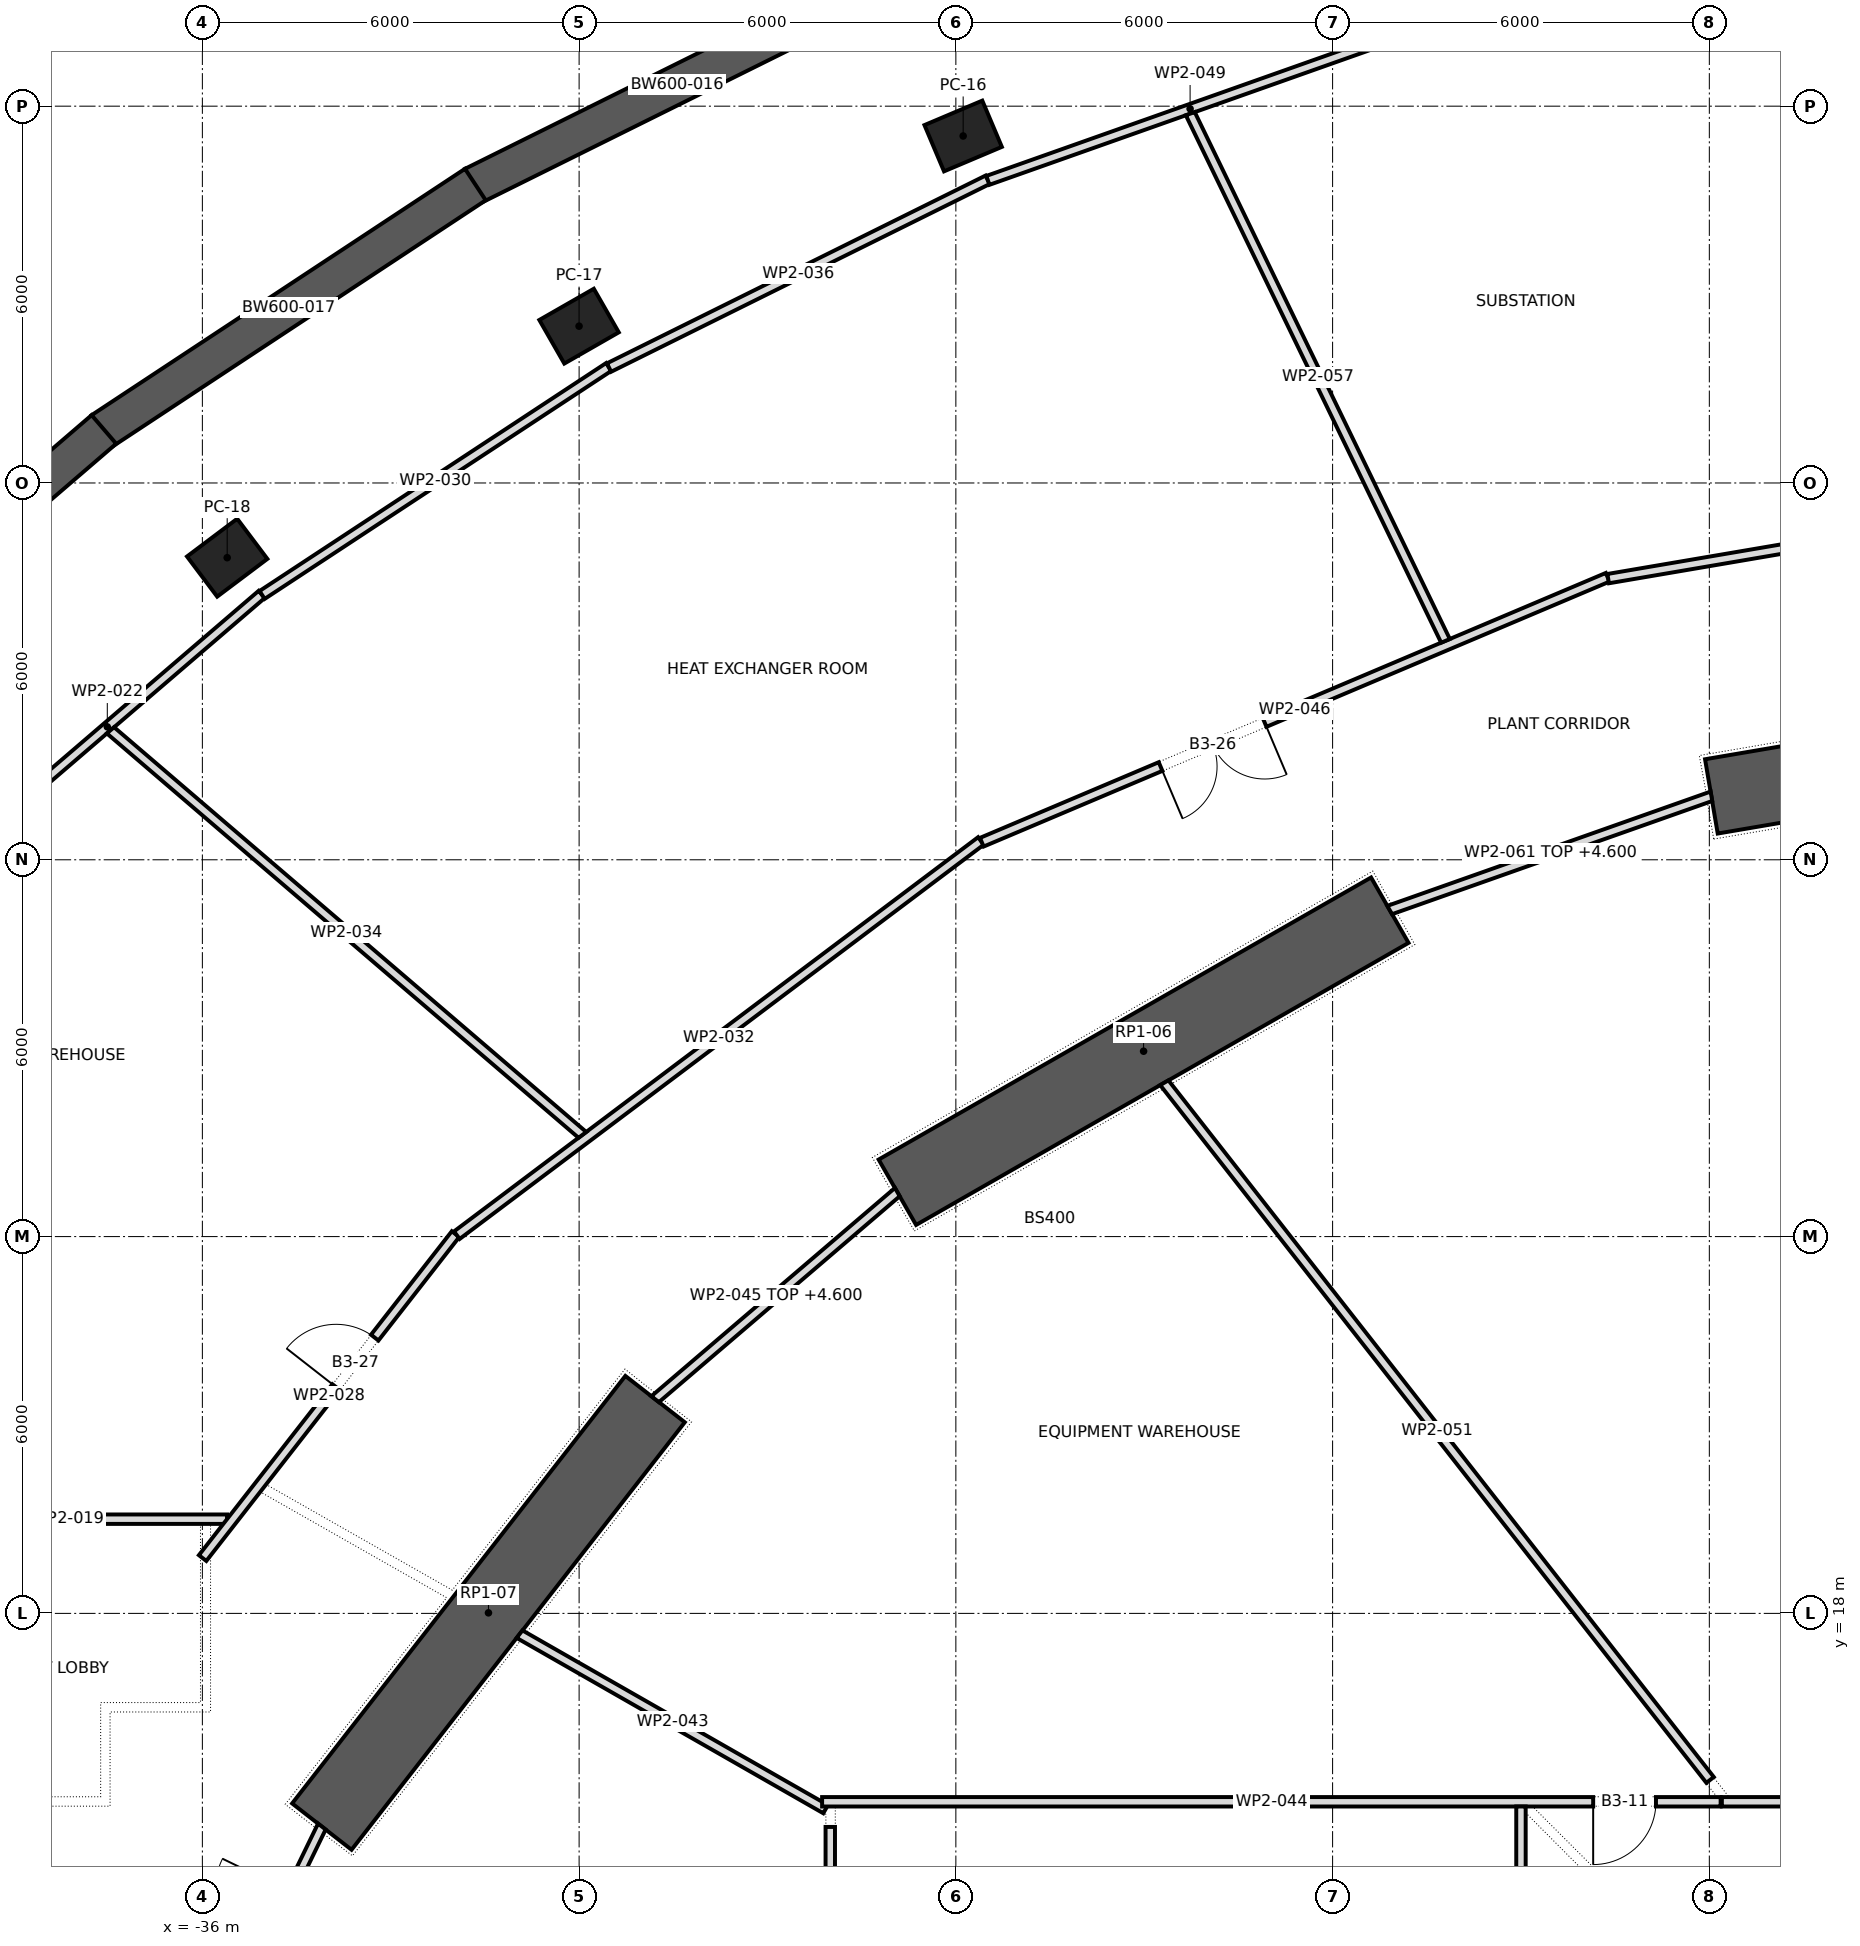
"""IFC4 building model, lengths in metres.
Left out: names, types, materials, properties, quantities, classifications, styles, units other than length and angle.
Written with IfcOpenShell. Run it as: python <this file> out.ifc"""

import sys

from ifc_helpers import new_model, si_unit, direction, frame, frame_2d, origin, origin_2d, place, context, subcontext, project, spatial, polyline, rectangle, outline, extrude, element, fill, save


model = new_model("IFC4")
c1 = context("Model", 3, precision=1e-05, world=origin(), true_north=direction((0.0, 1.0)))
c2 = subcontext(c1, "Body", "Model", "MODEL_VIEW")
j1 = project(units=[si_unit("LENGTHUNIT", "METRE"), si_unit("PLANEANGLEUNIT", "RADIAN")], contexts=[c1])
p1 = place(None, origin())
s1 = spatial("IfcSite", under=j1, at=p1, CompositionType="ELEMENT")
p2 = place(p1, origin())
s2 = spatial("IfcBuilding", under=s1, at=p2, CompositionType="ELEMENT")
p3 = place(p2, frame((0.0, 0.0, -15.0)))
s3 = spatial("IfcBuildingStorey", under=s2, at=p3, CompositionType="ELEMENT", Elevation=-15.0)
for number, where, z_axis, x_axis in (
    (1, (-23.884, 41.525, -0.4), (0.0, 0.0, 1.0), (-0.921, -0.389, 0.0)),
    (2, (-30.001, 38.497, -0.4), (0.0, 0.0, 1.0), (-0.868, -0.497, 0.0)),
    (3, (-35.605, 34.81, -0.4), (0.0, 0.0, 1.0), (-0.799, -0.601, 0.0)),
):
    element("IfcColumn", number, at=place(p3, frame(where, z_axis=z_axis, x_axis=x_axis)), inside=s3, PredefinedType="COLUMN", context=c2, shape_type="SweptSolid", body=[
        extrude(rectangle(XDim=1.0, YDim=0.8, at=origin_2d()), origin(), (0.0, 0.0, 1.0), 5.9),
    ])
p4 = place(p3, frame((-2.788, 32.574, -0.4), z_axis=(0.0, 0.0, 1.0), x_axis=(-0.985776286846, -0.168062822456, 0.0)))
e4 = element("IfcWall", 4, at=p4, inside=s3, PredefinedType="SHEAR", context=c2, shape_type="SweptSolid", body=[
    extrude(rectangle(XDim=9.312, YDim=1.2, at=frame_2d((4.656, 0.0))), origin(), (0.0, 0.0, 1.0), 5.9),
])
p5 = place(p3, frame((-17.089, 29.198, -0.4), z_axis=(0.0, 0.0, 1.0), x_axis=(-0.867760656864, -0.496982336103, 0.0)))
e5 = element("IfcWall", 5, at=p5, inside=s3, PredefinedType="SHEAR", context=c2, shape_type="SweptSolid", body=[
    extrude(rectangle(XDim=9.038, YDim=1.2, at=frame_2d((4.519, 0.0))), origin(), (0.0, 0.0, 1.0), 5.9),
])
p6 = place(p3, frame((-28.79, 21.412, -0.4), z_axis=(0.0, 0.0, 1.0), x_axis=(-0.614825322247, -0.788663314174, 0.0)))
e6 = element("IfcWall", 6, at=p6, inside=s3, PredefinedType="SHEAR", context=c2, shape_type="SweptSolid", body=[
    extrude(rectangle(XDim=8.632, YDim=1.2, at=frame_2d((4.316, 0.0))), origin(), (0.0, 0.0, 1.0), 5.9),
])
p7 = place(p3, frame((-25.195, 43.955, -0.4), z_axis=(0.0, 0.0, 1.0), x_axis=(-0.895750986496, -0.44455614965, 0.0)))
e7 = element("IfcWall", 7, at=p7, inside=s3, PredefinedType="SOLIDWALL", context=c2, shape_type="SweptSolid", body=[
    extrude(rectangle(XDim=7.245, YDim=0.6, at=frame_2d((3.623, 0.0))), origin(), (0.0, 0.0, 1.0), 5.9),
])
p8 = place(p3, frame((-31.652, 40.752, -0.4), z_axis=(0.0, 0.0, 1.0), x_axis=(-0.834745196239, -0.550636411215, 0.0)))
e8 = element("IfcWall", 8, at=p8, inside=s3, PredefinedType="SOLIDWALL", context=c2, shape_type="SweptSolid", body=[
    extrude(rectangle(XDim=7.124, YDim=0.6, at=frame_2d((3.562, 0.0))), origin(), (0.0, 0.0, 1.0), 5.9),
])
p9 = place(p3, frame((-37.568, 36.853, -0.4), z_axis=(0.0, 0.0, 1.0), x_axis=(-0.758319142722, -0.65188348482, 0.0)))
e9 = element("IfcWall", 9, at=p9, inside=s3, PredefinedType="SOLIDWALL", context=c2, shape_type="SweptSolid", body=[
    extrude(rectangle(XDim=6.991, YDim=0.6, at=frame_2d((3.496, 0.0))), origin(), (0.0, 0.0, 1.0), 5.9),
])
p10 = place(p3, frame((-40.675, 19.5, 0.0), z_axis=(0.0, 0.0, 1.0), x_axis=(1.0, 0.0, 0.0)))
e10 = element("IfcWall", 10, at=p10, inside=s3, PredefinedType="PARTITIONING", context=c2, shape_type="SweptSolid", body=[
    extrude(rectangle(XDim=5.068, YDim=0.15, at=frame_2d((2.534, 0.0))), origin(), (0.0, 0.0, 1.0), 5.15),
])
p11 = place(p3, frame((-39.973, 30.007, 0.0), z_axis=(0.0, 0.0, 1.0), x_axis=(0.759038455419, 0.651045791934, 0.0)))
e11 = element("IfcWall", 11, at=p11, inside=s3, PredefinedType="PARTITIONING", context=c2, shape_type="SweptSolid", body=[
    extrude(rectangle(XDim=6.479, YDim=0.15, at=frame_2d((3.24, 0.0))), origin(), (0.0, 0.0, 1.0), 5.15),
])
p12 = place(p3, frame((-36.15, 10.38, 0.0), z_axis=(0.0, 0.0, 1.0), x_axis=(0.436936398764, 0.899492403212, 0.0)))
e12 = element("IfcWall", 12, at=p12, inside=s3, PredefinedType="PARTITIONING", context=c2, shape_type="SweptSolid", body=[
    extrude(outline(polyline([(0.017, -0.075), (4.682, -0.075), (4.714, 0.075), (-0.017, 0.075), (0.017, -0.075)])), origin(), (0.0, 0.0, 1.0), 4.6),
])
p13 = place(p12, frame((1.146, 0.0, 0.0)))
e13 = element("IfcOpeningElement", 13, at=p13, cuts=e12, PredefinedType="OPENING", context=c2, shape_type="SweptSolid", body=[
    extrude(rectangle(XDim=2.4, YDim=2.1, at=frame_2d((1.2, 1.05))), frame((0.0, 0.087, 0.0), z_axis=(0.0, -1.0, 0.0), x_axis=(1.0, 0.0, 0.0)), (0.0, 0.0, 1.0), 0.174),
])
p14 = place(p3, frame((-35.996, 18.881, 0.0), z_axis=(0.0, 0.0, 1.0), x_axis=(0.615457986142, 0.788169694478, 0.0)))
e14 = element("IfcWall", 14, at=p14, inside=s3, PredefinedType="PARTITIONING", context=c2, shape_type="SweptSolid", body=[
    extrude(rectangle(XDim=6.545, YDim=0.15, at=frame_2d((3.272, 0.0))), origin(), (0.0, 0.0, 1.0), 5.15),
])
p15 = place(p14, frame((3.454, 0.0, 0.0)))
e15 = element("IfcOpeningElement", 15, at=p15, cuts=e14, PredefinedType="OPENING", context=c2, shape_type="SweptSolid", body=[
    extrude(rectangle(XDim=1.0, YDim=2.1, at=frame_2d((0.5, 1.05))), frame((0.0, 0.087, 0.0), z_axis=(0.0, -1.0, 0.0), x_axis=(1.0, 0.0, 0.0)), (0.0, 0.0, 1.0), 0.174),
])
p16 = place(p3, frame((-35.049, 34.217, 0.0), z_axis=(0.0, 0.0, 1.0), x_axis=(0.83553583791, 0.549435950378, 0.0)))
e16 = element("IfcWall", 16, at=p16, inside=s3, PredefinedType="PARTITIONING", context=c2, shape_type="SweptSolid", body=[
    extrude(rectangle(XDim=6.606, YDim=0.15, at=frame_2d((3.303, 0.0))), origin(), (0.0, 0.0, 1.0), 5.15),
])
p17 = place(p3, frame((-31.947, 24.022, 0.0), z_axis=(0.0, 0.0, 1.0), x_axis=(0.799194171191, 0.601072937949, 0.0)))
e17 = element("IfcWall", 17, at=p17, inside=s3, PredefinedType="PARTITIONING", context=c2, shape_type="SweptSolid", body=[
    extrude(rectangle(XDim=10.444, YDim=0.15, at=frame_2d((5.222, 0.0))), origin(), (0.0, 0.0, 1.0), 5.15),
])
p18 = place(p3, frame((-29.947, 25.619, 0.0), z_axis=(0.0, 0.0, 1.0), x_axis=(-0.759265306208, 0.650781218836, 0.0)))
e18 = element("IfcWall", 18, at=p18, inside=s3, PredefinedType="PARTITIONING", context=c2, shape_type="SweptSolid", body=[
    extrude(outline(polyline([(-0.017, -0.075), (9.888, -0.075), (9.911, 0.075), (0.017, 0.075), (-0.017, -0.075)])), origin(), (0.0, 0.0, 1.0), 5.15),
])
p19 = place(p3, frame((-29.523, 37.838, 0.0), z_axis=(0.0, 0.0, 1.0), x_axis=(0.895909442692, 0.444236727991, 0.0)))
e19 = element("IfcWall", 19, at=p19, inside=s3, PredefinedType="PARTITIONING", context=c2, shape_type="SweptSolid", body=[
    extrude(rectangle(XDim=6.731, YDim=0.15, at=frame_2d((3.365, 0.0))), origin(), (0.0, 0.0, 1.0), 5.15),
])
p20 = place(p3, frame((-26.0, 7.425, 0.0), z_axis=(0.0, 0.0, 1.0), x_axis=(0.0, 1.0, 0.0)))
e20 = element("IfcWall", 20, at=p20, inside=s3, PredefinedType="PARTITIONING", context=c2, shape_type="SweptSolid", body=[
    extrude(rectangle(XDim=7.175, YDim=0.15, at=frame_2d((3.587, 0.0))), origin(), (0.0, 0.0, 1.0), 5.15),
])
p21 = place(p3, frame((-26.074, 14.882, 0.0), z_axis=(0.0, 0.0, 1.0), x_axis=(-0.868133416031, 0.496330909746, 0.0)))
e21 = element("IfcWall", 21, at=p21, inside=s3, PredefinedType="PARTITIONING", context=c2, shape_type="SweptSolid", body=[
    extrude(outline(polyline([(0.0, -0.075), (5.604, -0.075), (5.626, 0.075), (0.0, 0.075), (0.0, -0.075)])), origin(), (0.0, 0.0, 1.0), 5.15),
])
p22 = place(p3, frame((-26.13, 15.0, 0.0), z_axis=(0.0, 0.0, 1.0), x_axis=(1.0, 0.0, 0.0)))
e22 = element("IfcWall", 22, at=p22, inside=s3, PredefinedType="PARTITIONING", context=c2, shape_type="SweptSolid", body=[
    extrude(rectangle(XDim=14.32, YDim=0.15, at=frame_2d((7.16, 0.0))), origin(), (0.0, 0.0, 1.0), 5.15),
])
p23 = place(p22, frame((12.28, 0.0, 0.0)))
e23 = element("IfcOpeningElement", 23, at=p23, cuts=e22, PredefinedType="OPENING", context=c2, shape_type="SweptSolid", body=[
    extrude(rectangle(XDim=1.0, YDim=2.1, at=frame_2d((0.5, 1.05))), frame((0.0, 0.087, 0.0), z_axis=(0.0, -1.0, 0.0), x_axis=(1.0, 0.0, 0.0)), (0.0, 0.0, 1.0), 0.174),
])
p24 = place(p3, frame((-24.932, 24.708, 0.0), z_axis=(0.0, 0.0, 1.0), x_axis=(-0.760084552743, -0.649824185978, 0.0)))
e24 = element("IfcWall", 24, at=p24, inside=s3, PredefinedType="PARTITIONING", context=c2, shape_type="SweptSolid", body=[
    extrude(outline(polyline([(-0.014, -0.075), (5.09, -0.075), (5.06, 0.075), (0.014, 0.075), (-0.014, -0.075)])), origin(), (0.0, 0.0, 1.0), 4.6),
])
p25 = place(p3, frame((-23.586, 30.28, 0.0), z_axis=(0.0, 0.0, 1.0), x_axis=(0.920903415875, 0.389790839591, 0.0)))
e25 = element("IfcWall", 25, at=p25, inside=s3, PredefinedType="PARTITIONING", context=c2, shape_type="SweptSolid", body=[
    extrude(rectangle(XDim=10.823, YDim=0.15, at=frame_2d((5.412, 0.0))), origin(), (0.0, 0.0, 1.0), 5.15),
])
p26 = place(p25, frame((3.091, 0.0, 0.0)))
e26 = element("IfcOpeningElement", 26, at=p26, cuts=e25, PredefinedType="OPENING", context=c2, shape_type="SweptSolid", body=[
    extrude(rectangle(XDim=1.8, YDim=2.1, at=frame_2d((0.9, 1.05))), frame((0.0, 0.087, 0.0), z_axis=(0.0, -1.0, 0.0), x_axis=(1.0, 0.0, 0.0)), (0.0, 0.0, 1.0), 0.174),
])
p27 = place(p3, frame((-23.49, 40.819, 0.0), z_axis=(0.0, 0.0, 1.0), x_axis=(0.942678523295, 0.333702265079, 0.0)))
e27 = element("IfcWall", 27, at=p27, inside=s3, PredefinedType="PARTITIONING", context=c2, shape_type="SweptSolid", body=[
    extrude(rectangle(XDim=6.832, YDim=0.15, at=frame_2d((3.416, 0.0))), origin(), (0.0, 0.0, 1.0), 5.15),
])
p28 = place(p3, frame((-20.68, 26.45, 0.0), z_axis=(0.0, 0.0, 1.0), x_axis=(0.616465586388, -0.787381851962, 0.0)))
e28 = element("IfcWall", 28, at=p28, inside=s3, PredefinedType="PARTITIONING", context=c2, shape_type="SweptSolid", body=[
    extrude(outline(polyline([(-0.011, -0.075), (14.1, -0.075), (14.1, 0.075), (0.011, 0.075), (-0.011, -0.075)])), origin(), (0.0, 0.0, 1.0), 5.15),
])
p29 = place(p3, frame((-16.202, 33.486, 0.0), z_axis=(0.0, 0.0, 1.0), x_axis=(-0.435764801027, 0.900060574731, 0.0)))
e29 = element("IfcWall", 29, at=p29, inside=s3, PredefinedType="PARTITIONING", context=c2, shape_type="SweptSolid", body=[
    extrude(outline(polyline([(-0.004, -0.075), (9.319, -0.075), (9.335, 0.075), (0.004, 0.075), (-0.004, -0.075)])), origin(), (0.0, 0.0, 1.0), 5.15),
])
p30 = place(p3, frame((-15.0, -14.925, 0.0), z_axis=(0.0, 0.0, 1.0), x_axis=(0.0, 1.0, 0.0)))
e30 = element("IfcWall", 30, at=p30, inside=s3, PredefinedType="PARTITIONING", context=c2, shape_type="SweptSolid", body=[
    extrude(rectangle(XDim=29.85, YDim=0.15, at=frame_2d((14.925, 0.0))), origin(), (0.0, 0.0, 1.0), 5.15),
])
p31 = place(p30, frame((25.66, 0.0, 0.0)))
e31 = element("IfcOpeningElement", 31, at=p31, cuts=e30, PredefinedType="OPENING", context=c2, shape_type="SweptSolid", body=[
    extrude(rectangle(XDim=1.0, YDim=2.1, at=frame_2d((0.5, 1.05))), frame((0.0, 0.087, 0.0), z_axis=(0.0, -1.0, 0.0), x_axis=(1.0, 0.0, 0.0)), (0.0, 0.0, 1.0), 0.174),
])
p32 = place(p30, frame((3.19, 0.0, 0.0)))
e32 = element("IfcOpeningElement", 32, at=p32, cuts=e30, PredefinedType="OPENING", context=c2, shape_type="SweptSolid", body=[
    extrude(rectangle(XDim=1.0, YDim=2.1, at=frame_2d((0.5, 1.05))), frame((0.0, 0.087, 0.0), z_axis=(0.0, -1.0, 0.0), x_axis=(1.0, 0.0, 0.0)), (0.0, 0.0, 1.0), 0.174),
])
p33 = place(p30, frame((13.725, 0.0, 0.0)))
e33 = element("IfcOpeningElement", 33, at=p33, cuts=e30, PredefinedType="OPENING", context=c2, shape_type="SweptSolid", body=[
    extrude(rectangle(XDim=2.4, YDim=2.1, at=frame_2d((1.2, 1.05))), frame((0.0, 0.087, 0.0), z_axis=(0.0, -1.0, 0.0), x_axis=(1.0, 0.0, 0.0)), (0.0, 0.0, 1.0), 0.174),
])
p34 = place(p3, frame((-13.611, 34.477, 0.0), z_axis=(0.0, 0.0, 1.0), x_axis=(0.985800134635, 0.16792288276, 0.0)))
e34 = element("IfcWall", 34, at=p34, inside=s3, PredefinedType="PARTITIONING", context=c2, shape_type="SweptSolid", body=[
    extrude(rectangle(XDim=11.074, YDim=0.15, at=frame_2d((5.537, 0.0))), origin(), (0.0, 0.0, 1.0), 5.15),
])
p35 = place(p34, frame((4.538, 0.0, 0.0)))
e35 = element("IfcOpeningElement", 35, at=p35, cuts=e34, PredefinedType="OPENING", context=c2, shape_type="SweptSolid", body=[
    extrude(rectangle(XDim=1.8, YDim=2.1, at=frame_2d((0.9, 1.05))), frame((0.0, 0.087, 0.0), z_axis=(0.0, -1.0, 0.0), x_axis=(1.0, 0.0, 0.0)), (0.0, 0.0, 1.0), 0.174),
])
p36 = place(p3, frame((-11.967, 31.011, 0.0), z_axis=(0.0, 0.0, 1.0), x_axis=(-0.942814385805, -0.333318217204, 0.0)))
e36 = element("IfcWall", 36, at=p36, inside=s3, PredefinedType="PARTITIONING", context=c2, shape_type="SweptSolid", body=[
    extrude(outline(polyline([(-0.013, -0.075), (5.448, -0.075), (5.421, 0.075), (0.013, 0.075), (-0.013, -0.075)])), origin(), (0.0, 0.0, 1.0), 4.6),
])
p37 = place(p3, frame((-11.811, 15.0, 0.0), z_axis=(0.0, 0.0, 1.0), x_axis=(1.0, 0.0, 0.0)))
e37 = element("IfcWall", 37, at=p37, inside=s3, PredefinedType="PARTITIONING", context=c2, shape_type="SweptSolid", body=[
    extrude(rectangle(XDim=10.686, YDim=0.15, at=frame_2d((5.343, 0.0))), origin(), (0.0, 0.0, 1.0), 5.15),
])
p38 = place(p37, frame((4.441, 0.0, 0.0)))
e38 = element("IfcOpeningElement", 38, at=p38, cuts=e37, PredefinedType="OPENING", context=c2, shape_type="SweptSolid", body=[
    extrude(rectangle(XDim=1.8, YDim=2.1, at=frame_2d((0.9, 1.05))), frame((0.0, 0.087, 0.0), z_axis=(0.0, -1.0, 0.0), x_axis=(1.0, 0.0, 0.0)), (0.0, 0.0, 1.0), 0.174),
])
p39 = place(p23, frame((1.0, 0.0, 0.0), z_axis=(0.0, 0.0, 1.0), x_axis=(-1.0, 0.0, 0.0)))
e39 = element("IfcDoor", 39, at=p39, inside=s3, OperationType="SINGLE_SWING_LEFT", PredefinedType="DOOR", context=c2, shape_type="SweptSolid", body=[
    extrude(rectangle(XDim=1.0, YDim=2.1, at=frame_2d((0.5, 1.05))), frame((0.0, 0.025, 0.0), z_axis=(0.0, -1.0, 0.0), x_axis=(1.0, 0.0, 0.0)), (0.0, 0.0, 1.0), 0.05),
])
fill(e23, e39)
p40 = place(p26, frame((1.8, 0.0, 0.0), z_axis=(0.0, 0.0, 1.0), x_axis=(-1.0, 0.0, 0.0)))
e40 = element("IfcDoor", 40, at=p40, inside=s3, OperationType="DOUBLE_DOOR_SINGLE_SWING", PredefinedType="DOOR", context=c2, shape_type="SweptSolid", body=[
    extrude(rectangle(XDim=1.8, YDim=2.1, at=frame_2d((0.9, 1.05))), frame((0.0, 0.025, 0.0), z_axis=(0.0, -1.0, 0.0), x_axis=(1.0, 0.0, 0.0)), (0.0, 0.0, 1.0), 0.05),
])
fill(e26, e40)
p41 = place(p15, origin())
e41 = element("IfcDoor", 41, at=p41, inside=s3, OperationType="SINGLE_SWING_RIGHT", PredefinedType="DOOR", context=c2, shape_type="SweptSolid", body=[
    extrude(rectangle(XDim=1.0, YDim=2.1, at=frame_2d((0.5, 1.05))), frame((0.0, 0.025, 0.0), z_axis=(0.0, -1.0, 0.0), x_axis=(1.0, 0.0, 0.0)), (0.0, 0.0, 1.0), 0.05),
])
fill(e15, e41)
save(model, sys.argv[1])
